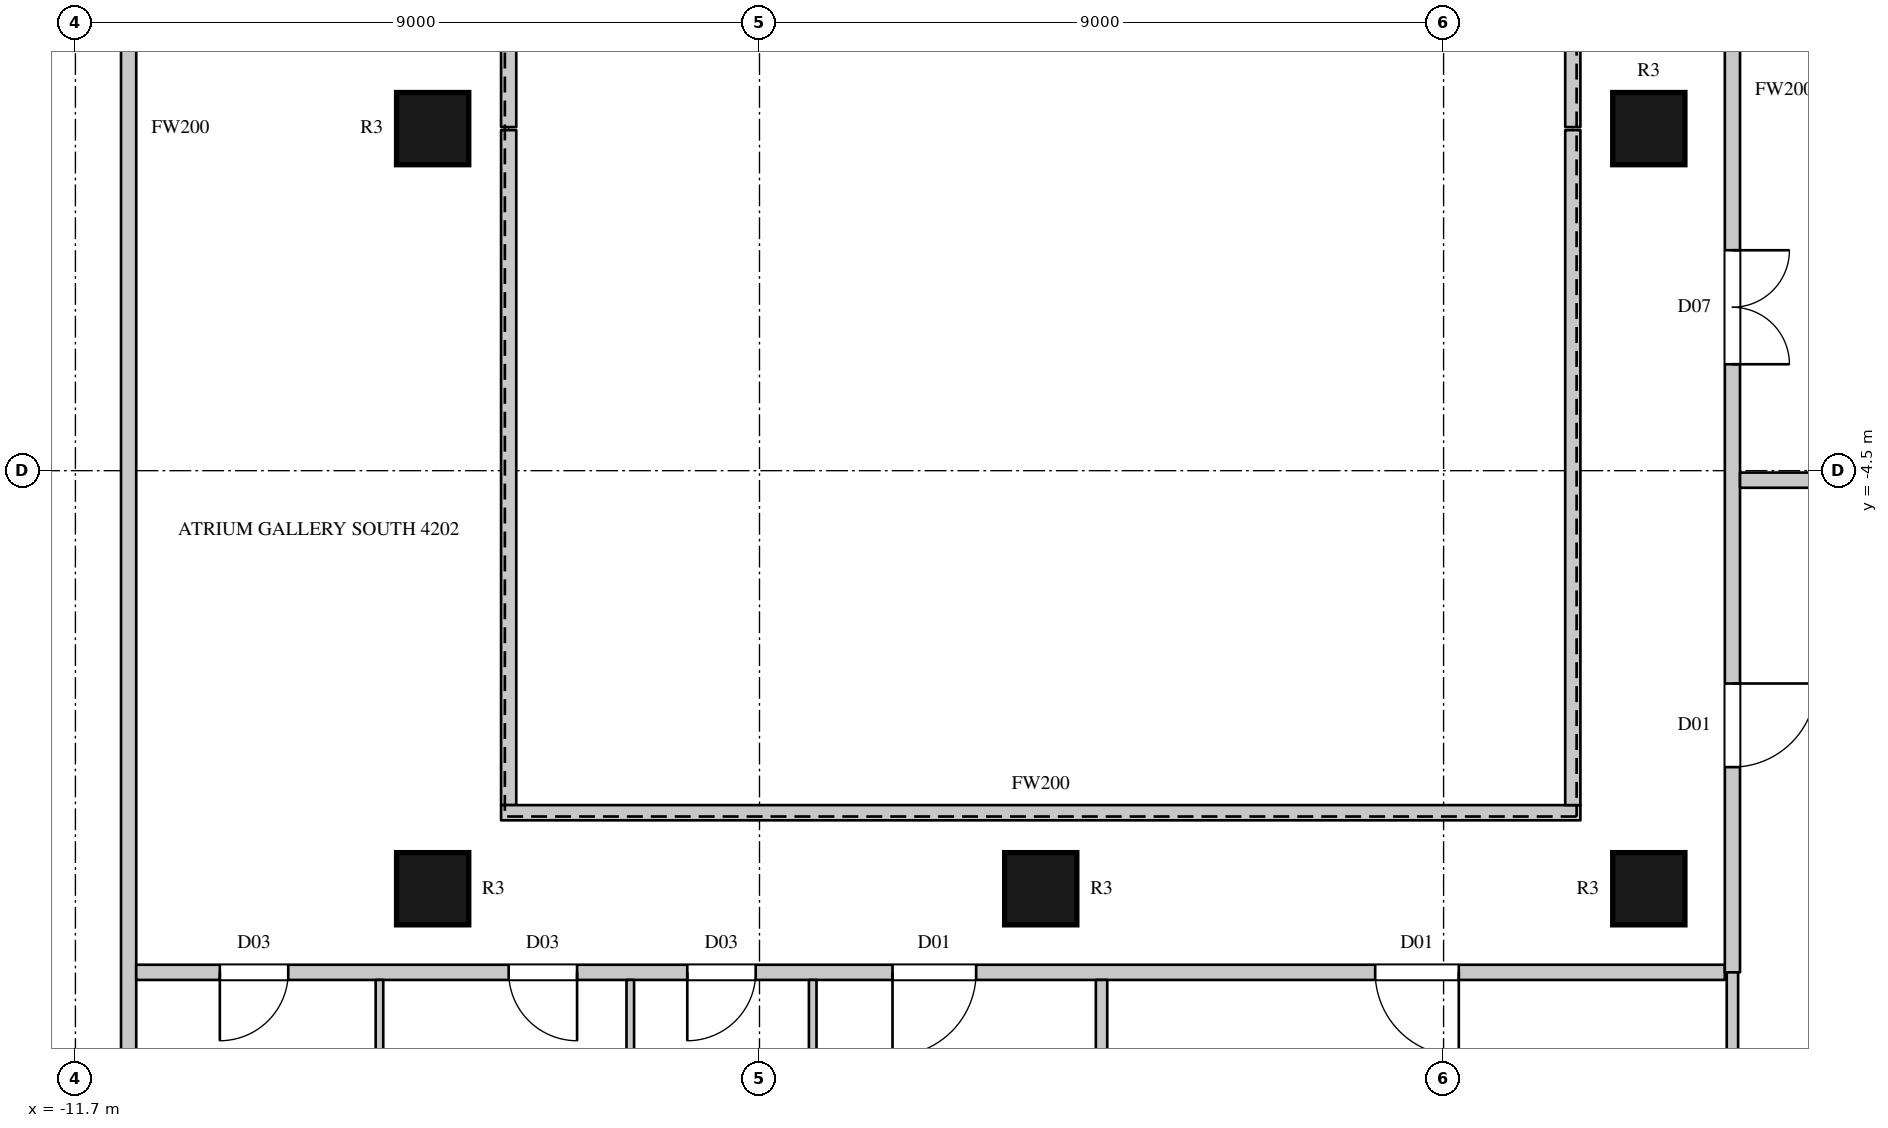
"""IFC4 building model, lengths in metres.
Left out: names, types, materials, properties, quantities, classifications, styles, units other than length and angle.
Written with IfcOpenShell. Run it as: python <this file> out.ifc"""

import sys

from ifc_helpers import new_model, si_unit, direction, frame, frame_2d, origin, origin_2d, place, context, subcontext, project, spatial, rectangle, circle, extrude, element, fill, save


model = new_model("IFC4")
c1 = context("Model", 3, precision=1e-05, world=origin(), true_north=direction((0.0, 1.0)))
c2 = subcontext(c1, "Body", "Model", "MODEL_VIEW")
j1 = project(units=[si_unit("LENGTHUNIT", "METRE"), si_unit("PLANEANGLEUNIT", "RADIAN")], contexts=[c1])
p1 = place(None, origin())
s1 = spatial("IfcSite", under=j1, at=p1, CompositionType="ELEMENT")
p2 = place(p1, origin())
s2 = spatial("IfcBuilding", under=s1, at=p2, CompositionType="ELEMENT")
p3 = place(p2, frame((0.0, 0.0, 193.3)))
s3 = spatial("IfcBuildingStorey", under=s2, at=p3, CompositionType="ELEMENT", Elevation=193.3)
for number, where, z_axis, x_axis in (
    (1, (-7.0, -10.0, 0.0), (0.0, 0.0, 1.0), (1.0, 0.0, 0.0)),
    (2, (-7.0, 0.0, 0.0), (0.0, 0.0, 1.0), (1.0, 0.0, 0.0)),
    (3, (1.0, -10.0, 0.0), (0.0, 0.0, 1.0), (1.0, 0.0, 0.0)),
    (4, (9.0, -10.0, 0.0), (0.0, 0.0, 1.0), (1.0, 0.0, 0.0)),
    (5, (9.0, 0.0, 0.0), (0.0, 0.0, 1.0), (1.0, 0.0, 0.0)),
):
    element("IfcColumn", number, at=place(p3, frame(where, z_axis=z_axis, x_axis=x_axis)), inside=s3, PredefinedType="COLUMN", context=c2, shape_type="SweptSolid", body=[
        extrude(circle(Radius=0.475, at=origin_2d()), origin(), (0.0, 0.0, 1.0), 4.1),
    ])
p4 = place(p3, frame((-11.0, -14.8, 0.0), z_axis=(0.0, 0.0, 1.0), x_axis=(0.0, 1.0, 0.0)))
e6 = element("IfcWall", 6, at=p4, inside=s3, PredefinedType="PARTITIONING", context=c2, shape_type="SweptSolid", body=[
    extrude(rectangle(XDim=29.6, YDim=0.2, at=frame_2d((14.8, 0.0))), origin(), (0.0, 0.0, 1.0), 3.8),
])
p5 = place(p4, frame((20.15, 0.0, 0.0)))
e7 = element("IfcOpeningElement", 7, at=p5, cuts=e6, PredefinedType="OPENING", context=c2, shape_type="SweptSolid", body=[
    extrude(rectangle(XDim=1.5, YDim=2.4, at=frame_2d((0.75, 1.2))), frame((0.0, 0.11, 0.0), z_axis=(0.0, -1.0, 0.0), x_axis=(1.0, 0.0, 0.0)), (0.0, 0.0, 1.0), 0.22),
])
p6 = place(p3, frame((-10.9, -11.1, 0.0), z_axis=(0.0, 0.0, 1.0), x_axis=(1.0, 0.0, 0.0)))
e8 = element("IfcWall", 8, at=p6, inside=s3, PredefinedType="PARTITIONING", context=c2, shape_type="SweptSolid", body=[
    extrude(rectangle(XDim=20.9, YDim=0.2, at=frame_2d((10.45, 0.0))), origin(), (0.0, 0.0, 1.0), 3.8),
])
p7 = place(p6, frame((1.1, 0.0, 0.0)))
e9 = element("IfcOpeningElement", 9, at=p7, cuts=e8, PredefinedType="OPENING", context=c2, shape_type="SweptSolid", body=[
    extrude(rectangle(XDim=0.9, YDim=2.2, at=frame_2d((0.45, 1.1))), frame((0.0, 0.11, 0.0), z_axis=(0.0, -1.0, 0.0), x_axis=(1.0, 0.0, 0.0)), (0.0, 0.0, 1.0), 0.22),
])
p8 = place(p6, frame((4.9, 0.0, 0.0)))
e10 = element("IfcOpeningElement", 10, at=p8, cuts=e8, PredefinedType="OPENING", context=c2, shape_type="SweptSolid", body=[
    extrude(rectangle(XDim=0.9, YDim=2.2, at=frame_2d((0.45, 1.1))), frame((0.0, 0.11, 0.0), z_axis=(0.0, -1.0, 0.0), x_axis=(1.0, 0.0, 0.0)), (0.0, 0.0, 1.0), 0.22),
])
p9 = place(p6, frame((7.25, 0.0, 0.0)))
e11 = element("IfcOpeningElement", 11, at=p9, cuts=e8, PredefinedType="OPENING", context=c2, shape_type="SweptSolid", body=[
    extrude(rectangle(XDim=0.9, YDim=2.2, at=frame_2d((0.45, 1.1))), frame((0.0, 0.11, 0.0), z_axis=(0.0, -1.0, 0.0), x_axis=(1.0, 0.0, 0.0)), (0.0, 0.0, 1.0), 0.22),
])
p10 = place(p6, frame((9.95, 0.0, 0.0)))
e12 = element("IfcOpeningElement", 12, at=p10, cuts=e8, PredefinedType="OPENING", context=c2, shape_type="SweptSolid", body=[
    extrude(rectangle(XDim=1.1, YDim=2.4, at=frame_2d((0.55, 1.2))), frame((0.0, 0.11, 0.0), z_axis=(0.0, -1.0, 0.0), x_axis=(1.0, 0.0, 0.0)), (0.0, 0.0, 1.0), 0.22),
])
p11 = place(p6, frame((16.3, 0.0, 0.0)))
e13 = element("IfcOpeningElement", 13, at=p11, cuts=e8, PredefinedType="OPENING", context=c2, shape_type="SweptSolid", body=[
    extrude(rectangle(XDim=1.1, YDim=2.4, at=frame_2d((0.55, 1.2))), frame((0.0, 0.11, 0.0), z_axis=(0.0, -1.0, 0.0), x_axis=(1.0, 0.0, 0.0)), (0.0, 0.0, 1.0), 0.22),
])
p12 = place(p3, frame((-6.0, -8.9, 0.0), z_axis=(0.0, 0.0, 1.0), x_axis=(0.0, 1.0, 0.0)))
e14 = element("IfcWall", 14, at=p12, inside=s3, PredefinedType="PARTITIONING", context=c2, shape_type="SweptSolid", body=[
    extrude(rectangle(XDim=8.88, YDim=0.2, at=frame_2d((4.44, 0.0))), origin(), (0.0, 0.0, 1.0), 3.8),
])
p13 = place(p3, frame((-6.1, -9.0, 0.0), z_axis=(0.0, 0.0, 1.0), x_axis=(1.0, 0.0, 0.0)))
e15 = element("IfcWall", 15, at=p13, inside=s3, PredefinedType="PARTITIONING", context=c2, shape_type="SweptSolid", body=[
    extrude(rectangle(XDim=14.2, YDim=0.2, at=frame_2d((7.1, 0.0))), origin(), (0.0, 0.0, 1.0), 3.8),
])
for number, where, z_axis, x_axis in (
    (16, (-6.0, 0.02, 0.0), (0.0, 0.0, 1.0), (0.0, 1.0, 0.0)),
    (17, (8.0, -8.9, 0.0), (0.0, 0.0, 1.0), (0.0, 1.0, 0.0)),
    (18, (8.0, 0.02, 0.0), (0.0, 0.0, 1.0), (0.0, 1.0, 0.0)),
):
    element("IfcWall", number, at=place(p3, frame(where, z_axis=z_axis, x_axis=x_axis)), inside=s3, PredefinedType="PARTITIONING", context=c2, shape_type="SweptSolid", body=[
        extrude(rectangle(XDim=8.88, YDim=0.2, at=frame_2d((4.44, 0.0))), origin(), (0.0, 0.0, 1.0), 3.8),
    ])
p14 = place(p3, frame((10.1, -11.1, 0.0), z_axis=(0.0, 0.0, 1.0), x_axis=(0.0, 1.0, 0.0)))
e19 = element("IfcWall", 19, at=p14, inside=s3, PredefinedType="PARTITIONING", context=c2, shape_type="SweptSolid", body=[
    extrude(rectangle(XDim=23.2, YDim=0.2, at=frame_2d((11.6, 0.0))), origin(), (0.0, 0.0, 1.0), 3.8),
])
p15 = place(p14, frame((8.0, 0.0, 0.0)))
e20 = element("IfcOpeningElement", 20, at=p15, cuts=e19, PredefinedType="OPENING", context=c2, shape_type="SweptSolid", body=[
    extrude(rectangle(XDim=1.5, YDim=2.4, at=frame_2d((0.75, 1.2))), frame((0.0, 0.11, 0.0), z_axis=(0.0, -1.0, 0.0), x_axis=(1.0, 0.0, 0.0)), (0.0, 0.0, 1.0), 0.22),
])
p16 = place(p14, frame((18.95, 0.0, 0.0)))
e21 = element("IfcOpeningElement", 21, at=p16, cuts=e19, PredefinedType="OPENING", context=c2, shape_type="SweptSolid", body=[
    extrude(rectangle(XDim=1.1, YDim=2.4, at=frame_2d((0.55, 1.2))), frame((0.0, 0.11, 0.0), z_axis=(0.0, -1.0, 0.0), x_axis=(1.0, 0.0, 0.0)), (0.0, 0.0, 1.0), 0.22),
])
p17 = place(p14, frame((2.7, 0.0, 0.0)))
e22 = element("IfcOpeningElement", 22, at=p17, cuts=e19, PredefinedType="OPENING", context=c2, shape_type="SweptSolid", body=[
    extrude(rectangle(XDim=1.1, YDim=2.4, at=frame_2d((0.55, 1.2))), frame((0.0, 0.11, 0.0), z_axis=(0.0, -1.0, 0.0), x_axis=(1.0, 0.0, 0.0)), (0.0, 0.0, 1.0), 0.22),
])
p18 = place(p3, frame((10.2, -4.625, 0.0), z_axis=(0.0, 0.0, 1.0), x_axis=(1.0, 0.0, 0.0)))
e23 = element("IfcWall", 23, at=p18, inside=s3, PredefinedType="PARTITIONING", context=c2, shape_type="SweptSolid", body=[
    extrude(rectangle(XDim=4.475, YDim=0.2, at=frame_2d((2.238, 0.0))), origin(), (0.0, 0.0, 1.0), 3.8),
])
p19 = place(p3, frame((1.8, -16.7, 0.0), z_axis=(0.0, 0.0, 1.0), x_axis=(0.0, 1.0, 0.0)))
e24 = element("IfcWall", 24, at=p19, inside=s3, PredefinedType="PARTITIONING", context=c2, shape_type="SweptSolid", body=[
    extrude(rectangle(XDim=5.5, YDim=0.15, at=frame_2d((2.75, 0.0))), origin(), (0.0, 0.0, 1.0), 3.15),
])
p20 = place(p3, frame((10.1, -16.7, 0.0), z_axis=(0.0, 0.0, 1.0), x_axis=(0.0, 1.0, 0.0)))
e25 = element("IfcWall", 25, at=p20, inside=s3, PredefinedType="PARTITIONING", context=c2, shape_type="SweptSolid", body=[
    extrude(rectangle(XDim=5.6, YDim=0.15, at=frame_2d((2.8, 0.0))), origin(), (0.0, 0.0, 1.0), 3.8),
])
for number, where, z_axis, x_axis in (
    (26, (-7.7, -16.7, 0.0), (0.0, 0.0, 1.0), (0.0, 1.0, 0.0)),
    (27, (-4.4, -16.7, 0.0), (0.0, 0.0, 1.0), (0.0, 1.0, 0.0)),
    (28, (-2.0, -16.7, 0.0), (0.0, 0.0, 1.0), (0.0, 1.0, 0.0)),
):
    element("IfcWall", number, at=place(p3, frame(where, z_axis=z_axis, x_axis=x_axis)), inside=s3, PredefinedType="PARTITIONING", context=c2, shape_type="SweptSolid", body=[
        extrude(rectangle(XDim=5.5, YDim=0.1, at=frame_2d((2.75, 0.0))), origin(), (0.0, 0.0, 1.0), 3.8),
    ])
p21 = place(p15, origin())
e29 = element("IfcDoor", 29, at=p21, inside=s3, OperationType="DOUBLE_DOOR_SINGLE_SWING", PredefinedType="DOOR", context=c2, shape_type="SweptSolid", body=[
    extrude(rectangle(XDim=1.5, YDim=2.4, at=frame_2d((0.75, 1.2))), frame((0.0, 0.025, 0.0), z_axis=(0.0, -1.0, 0.0), x_axis=(1.0, 0.0, 0.0)), (0.0, 0.0, 1.0), 0.05),
])
fill(e20, e29)
p22 = place(p7, origin())
e30 = element("IfcDoor", 30, at=p22, inside=s3, OperationType="SINGLE_SWING_RIGHT", PredefinedType="DOOR", context=c2, shape_type="SweptSolid", body=[
    extrude(rectangle(XDim=0.9, YDim=2.2, at=frame_2d((0.45, 1.1))), frame((0.0, 0.025, 0.0), z_axis=(0.0, -1.0, 0.0), x_axis=(1.0, 0.0, 0.0)), (0.0, 0.0, 1.0), 0.05),
])
fill(e9, e30)
p23 = place(p8, origin())
e31 = element("IfcDoor", 31, at=p23, inside=s3, OperationType="SINGLE_SWING_LEFT", PredefinedType="DOOR", context=c2, shape_type="SweptSolid", body=[
    extrude(rectangle(XDim=0.9, YDim=2.2, at=frame_2d((0.45, 1.1))), frame((0.0, 0.025, 0.0), z_axis=(0.0, -1.0, 0.0), x_axis=(1.0, 0.0, 0.0)), (0.0, 0.0, 1.0), 0.05),
])
fill(e10, e31)
p24 = place(p9, origin())
e32 = element("IfcDoor", 32, at=p24, inside=s3, OperationType="SINGLE_SWING_RIGHT", PredefinedType="DOOR", context=c2, shape_type="SweptSolid", body=[
    extrude(rectangle(XDim=0.9, YDim=2.2, at=frame_2d((0.45, 1.1))), frame((0.0, 0.025, 0.0), z_axis=(0.0, -1.0, 0.0), x_axis=(1.0, 0.0, 0.0)), (0.0, 0.0, 1.0), 0.05),
])
fill(e11, e32)
p25 = place(p10, origin())
e33 = element("IfcDoor", 33, at=p25, inside=s3, OperationType="SINGLE_SWING_RIGHT", PredefinedType="DOOR", context=c2, shape_type="SweptSolid", body=[
    extrude(rectangle(XDim=1.1, YDim=2.4, at=frame_2d((0.55, 1.2))), frame((0.0, 0.025, 0.0), z_axis=(0.0, -1.0, 0.0), x_axis=(1.0, 0.0, 0.0)), (0.0, 0.0, 1.0), 0.05),
])
fill(e12, e33)
p26 = place(p11, origin())
e34 = element("IfcDoor", 34, at=p26, inside=s3, OperationType="SINGLE_SWING_LEFT", PredefinedType="DOOR", context=c2, shape_type="SweptSolid", body=[
    extrude(rectangle(XDim=1.1, YDim=2.4, at=frame_2d((0.55, 1.2))), frame((0.0, 0.025, 0.0), z_axis=(0.0, -1.0, 0.0), x_axis=(1.0, 0.0, 0.0)), (0.0, 0.0, 1.0), 0.05),
])
fill(e13, e34)
p27 = place(p17, origin())
e35 = element("IfcDoor", 35, at=p27, inside=s3, OperationType="SINGLE_SWING_LEFT", PredefinedType="DOOR", context=c2, shape_type="SweptSolid", body=[
    extrude(rectangle(XDim=1.1, YDim=2.4, at=frame_2d((0.55, 1.2))), frame((0.0, 0.025, 0.0), z_axis=(0.0, -1.0, 0.0), x_axis=(1.0, 0.0, 0.0)), (0.0, 0.0, 1.0), 0.05),
])
fill(e22, e35)
save(model, sys.argv[1])
